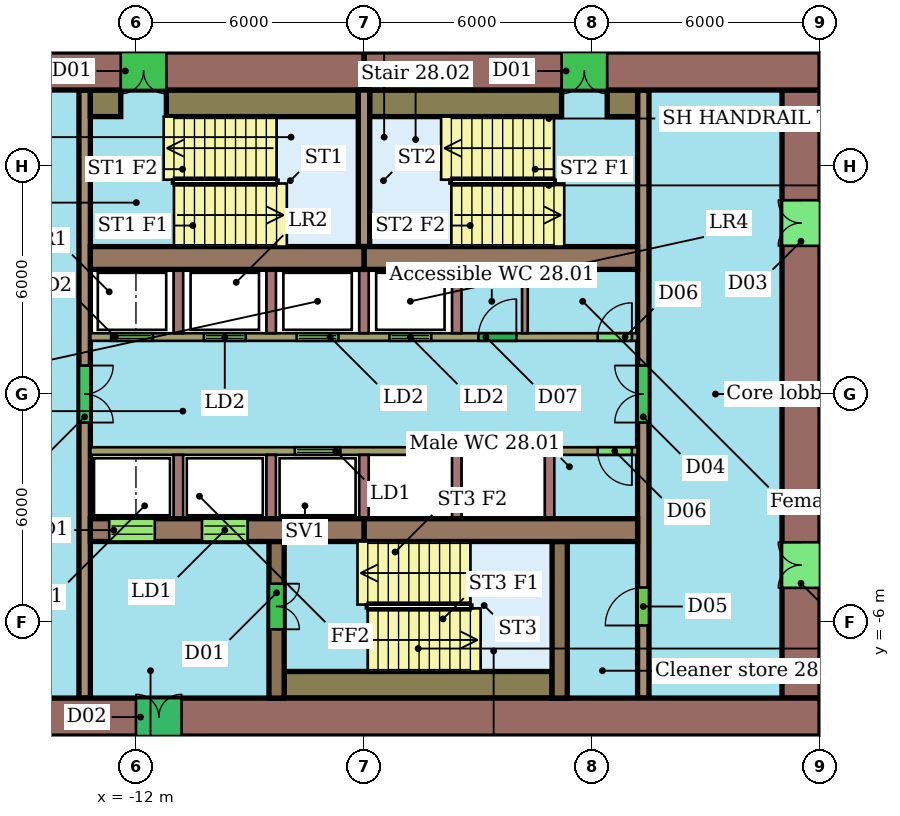
"""IFC4 building model, lengths in metres.
Left out: names, types, materials, properties, quantities, classifications, styles, units other than length and angle.
Written with IfcOpenShell. Run it as: python <this file> out.ifc"""

import sys

from ifc_helpers import new_model, si_unit, direction, frame, frame_2d, origin, place, context, subcontext, project, spatial, rectangle, extrude, element, fill, save


model = new_model("IFC4")
c1 = context("Model", 3, precision=1e-05, world=origin(), true_north=direction((0.0, 1.0)))
c2 = subcontext(c1, "Body", "Model", "MODEL_VIEW")
j1 = project(units=[si_unit("LENGTHUNIT", "METRE"), si_unit("PLANEANGLEUNIT", "RADIAN")], contexts=[c1])
p1 = place(None, origin())
s1 = spatial("IfcSite", under=j1, at=p1, CompositionType="ELEMENT")
p2 = place(p1, origin())
s2 = spatial("IfcBuilding", under=s1, at=p2, CompositionType="ELEMENT")
p3 = place(p2, frame((0.0, 0.0, 121.0)))
s3 = spatial("IfcBuildingStorey", under=s2, at=p3, CompositionType="ELEMENT", Elevation=121.0)
p4 = place(p3, frame((6.0, 8.5, 0.0), z_axis=(0.0, 0.0, 1.0), x_axis=(-1.0, 0.0, 0.0)))
e1 = element("IfcWall", 1, at=p4, inside=s3, PredefinedType="SHEAR", context=c2, shape_type="SweptSolid", body=[
    extrude(rectangle(XDim=12.0, YDim=1.0, at=frame_2d((6.0, 0.0))), origin(), (0.0, 0.0, 1.0), 3.3),
])
p5 = place(p4, frame((5.6, 0.0, 0.0)))
e2 = element("IfcOpeningElement", 2, at=p5, cuts=e1, PredefinedType="OPENING", context=c2, shape_type="SweptSolid", body=[
    extrude(rectangle(XDim=1.2, YDim=2.1, at=frame_2d((0.6, 1.05))), frame((0.0, 0.51, 0.0), z_axis=(0.0, -1.0, 0.0), x_axis=(1.0, 0.0, 0.0)), (0.0, 0.0, 1.0), 1.02),
])
p6 = place(p3, frame((-6.0, 8.5, 0.0), z_axis=(0.0, 0.0, 1.0), x_axis=(-1.0, 0.0, 0.0)))
e3 = element("IfcWall", 3, at=p6, inside=s3, PredefinedType="SHEAR", context=c2, shape_type="SweptSolid", body=[
    extrude(rectangle(XDim=12.0, YDim=1.0, at=frame_2d((6.0, 0.0))), origin(), (0.0, 0.0, 1.0), 3.3),
])
p7 = place(p6, frame((5.2, 0.0, 0.0)))
e4 = element("IfcOpeningElement", 4, at=p7, cuts=e3, PredefinedType="OPENING", context=c2, shape_type="SweptSolid", body=[
    extrude(rectangle(XDim=1.2, YDim=2.1, at=frame_2d((0.6, 1.05))), frame((0.0, 0.51, 0.0), z_axis=(0.0, -1.0, 0.0), x_axis=(1.0, 0.0, 0.0)), (0.0, 0.0, 1.0), 1.02),
])
p8 = place(p3, frame((-18.0, -8.5, 0.0), z_axis=(0.0, 0.0, 1.0), x_axis=(1.0, 0.0, 0.0)))
e5 = element("IfcWall", 5, at=p8, inside=s3, PredefinedType="SHEAR", context=c2, shape_type="SweptSolid", body=[
    extrude(rectangle(XDim=24.0, YDim=1.0, at=frame_2d((12.0, 0.0))), origin(), (0.0, 0.0, 1.0), 3.3),
])
p9 = place(p8, frame((6.0, 0.0, 0.0)))
e6 = element("IfcOpeningElement", 6, at=p9, cuts=e5, PredefinedType="OPENING", context=c2, shape_type="SweptSolid", body=[
    extrude(rectangle(XDim=1.2, YDim=2.1, at=frame_2d((0.6, 1.05))), frame((0.0, 0.51, 0.0), z_axis=(0.0, -1.0, 0.0), x_axis=(1.0, 0.0, 0.0)), (0.0, 0.0, 1.0), 1.02),
])
p10 = place(p3, frame((5.5, -8.0, 0.0), z_axis=(0.0, 0.0, 1.0), x_axis=(0.0, 1.0, 0.0)))
e7 = element("IfcWall", 7, at=p10, inside=s3, PredefinedType="SHEAR", context=c2, shape_type="SweptSolid", body=[
    extrude(rectangle(XDim=16.0, YDim=1.0, at=frame_2d((8.0, 0.0))), origin(), (0.0, 0.0, 1.0), 3.3),
])
p11 = place(p10, frame((2.9, 0.0, 0.0)))
e8 = element("IfcOpeningElement", 8, at=p11, cuts=e7, PredefinedType="OPENING", context=c2, shape_type="SweptSolid", body=[
    extrude(rectangle(XDim=1.2, YDim=2.1, at=frame_2d((0.6, 1.05))), frame((0.0, 0.51, 0.0), z_axis=(0.0, -1.0, 0.0), x_axis=(1.0, 0.0, 0.0)), (0.0, 0.0, 1.0), 1.02),
])
p12 = place(p10, frame((11.9, 0.0, 0.0)))
e9 = element("IfcOpeningElement", 9, at=p12, cuts=e7, PredefinedType="OPENING", context=c2, shape_type="SweptSolid", body=[
    extrude(rectangle(XDim=1.2, YDim=2.1, at=frame_2d((0.6, 1.05))), frame((0.0, 0.51, 0.0), z_axis=(0.0, -1.0, 0.0), x_axis=(1.0, 0.0, 0.0)), (0.0, 0.0, 1.0), 1.02),
])
for number, where, z_axis, x_axis in (
    (10, (-13.2, 3.58, 0.0), (0.0, 0.0, 1.0), (1.0, 0.0, 0.0)),
    (11, (-6.0, 3.58, 0.0), (0.0, 0.0, 1.0), (1.0, 0.0, 0.0)),
):
    element("IfcWall", number, at=place(p3, frame(where, z_axis=z_axis, x_axis=x_axis)), inside=s3, PredefinedType="SHEAR", context=c2, shape_type="SweptSolid", body=[
        extrude(rectangle(XDim=7.2, YDim=0.6, at=frame_2d((3.6, 0.0))), origin(), (0.0, 0.0, 1.0), 3.3),
    ])
p13 = place(p3, frame((-13.2, -3.58, 0.0), z_axis=(0.0, 0.0, 1.0), x_axis=(1.0, 0.0, 0.0)))
e12 = element("IfcWall", 12, at=p13, inside=s3, PredefinedType="SHEAR", context=c2, shape_type="SweptSolid", body=[
    extrude(rectangle(XDim=7.2, YDim=0.6, at=frame_2d((3.6, 0.0))), origin(), (0.0, 0.0, 1.0), 3.3),
])
p14 = place(p13, frame((0.496, 0.0, 0.0)))
e13 = element("IfcOpeningElement", 13, at=p14, cuts=e12, PredefinedType="OPENING", context=c2, shape_type="SweptSolid", body=[
    extrude(rectangle(XDim=1.2, YDim=2.1, at=frame_2d((0.6, 1.05))), frame((0.0, 0.31, 0.0), z_axis=(0.0, -1.0, 0.0), x_axis=(1.0, 0.0, 0.0)), (0.0, 0.0, 1.0), 0.62),
])
p15 = place(p13, frame((2.938, 0.0, 0.0)))
e14 = element("IfcOpeningElement", 14, at=p15, cuts=e12, PredefinedType="OPENING", context=c2, shape_type="SweptSolid", body=[
    extrude(rectangle(XDim=1.2, YDim=2.1, at=frame_2d((0.6, 1.05))), frame((0.0, 0.31, 0.0), z_axis=(0.0, -1.0, 0.0), x_axis=(1.0, 0.0, 0.0)), (0.0, 0.0, 1.0), 0.62),
])
p16 = place(p3, frame((-6.0, -3.58, 0.0), z_axis=(0.0, 0.0, 1.0), x_axis=(1.0, 0.0, 0.0)))
e15 = element("IfcWall", 15, at=p16, inside=s3, PredefinedType="SHEAR", context=c2, shape_type="SweptSolid", body=[
    extrude(rectangle(XDim=7.2, YDim=0.6, at=frame_2d((3.6, 0.0))), origin(), (0.0, 0.0, 1.0), 3.3),
])
p17 = place(p3, frame((-13.35, 8.0, 0.0), z_axis=(0.0, 0.0, 1.0), x_axis=(0.0, -1.0, 0.0)))
e16 = element("IfcWall", 16, at=p17, inside=s3, PredefinedType="SHEAR", context=c2, shape_type="SweptSolid", body=[
    extrude(rectangle(XDim=16.0, YDim=0.3, at=frame_2d((8.0, 0.0))), origin(), (0.0, 0.0, 1.0), 3.3),
])
p18 = place(p17, frame((7.25, 0.0, 0.0)))
e17 = element("IfcOpeningElement", 17, at=p18, cuts=e16, PredefinedType="OPENING", context=c2, shape_type="SweptSolid", body=[
    extrude(rectangle(XDim=1.5, YDim=2.1, at=frame_2d((0.75, 1.05))), frame((0.0, 0.16, 0.0), z_axis=(0.0, -1.0, 0.0), x_axis=(1.0, 0.0, 0.0)), (0.0, 0.0, 1.0), 0.32),
])
p19 = place(p3, frame((1.35, -8.0, 0.0), z_axis=(0.0, 0.0, 1.0), x_axis=(0.0, 1.0, 0.0)))
e18 = element("IfcWall", 18, at=p19, inside=s3, PredefinedType="SHEAR", context=c2, shape_type="SweptSolid", body=[
    extrude(rectangle(XDim=16.0, YDim=0.3, at=frame_2d((8.0, 0.0))), origin(), (0.0, 0.0, 1.0), 3.3),
])
p20 = place(p19, frame((1.91, 0.0, 0.0)))
e19 = element("IfcOpeningElement", 19, at=p20, cuts=e18, PredefinedType="OPENING", context=c2, shape_type="SweptSolid", body=[
    extrude(rectangle(XDim=1.0, YDim=2.1, at=frame_2d((0.5, 1.05))), frame((0.0, 0.16, 0.0), z_axis=(0.0, -1.0, 0.0), x_axis=(1.0, 0.0, 0.0)), (0.0, 0.0, 1.0), 0.32),
])
p21 = place(p19, frame((7.25, 0.0, 0.0)))
e20 = element("IfcOpeningElement", 20, at=p21, cuts=e18, PredefinedType="OPENING", context=c2, shape_type="SweptSolid", body=[
    extrude(rectangle(XDim=1.5, YDim=2.1, at=frame_2d((0.75, 1.05))), frame((0.0, 0.16, 0.0), z_axis=(0.0, -1.0, 0.0), x_axis=(1.0, 0.0, 0.0)), (0.0, 0.0, 1.0), 0.32),
])
p22 = place(p3, frame((-13.2, 1.5, 0.0), z_axis=(0.0, 0.0, 1.0), x_axis=(1.0, 0.0, 0.0)))
e21 = element("IfcWall", 21, at=p22, inside=s3, PredefinedType="SHEAR", context=c2, shape_type="SweptSolid", body=[
    extrude(rectangle(XDim=14.4, YDim=0.2, at=frame_2d((7.2, 0.0))), origin(), (0.0, 0.0, 1.0), 3.3),
])
p23 = place(p22, frame((0.546, 0.0, 0.0)))
e22 = element("IfcOpeningElement", 22, at=p23, cuts=e21, PredefinedType="OPENING", context=c2, shape_type="SweptSolid", body=[
    extrude(rectangle(XDim=1.1, YDim=2.1, at=frame_2d((0.55, 1.05))), frame((0.0, 0.11, 0.0), z_axis=(0.0, -1.0, 0.0), x_axis=(1.0, 0.0, 0.0)), (0.0, 0.0, 1.0), 0.22),
])
p24 = place(p22, frame((2.988, 0.0, 0.0)))
e23 = element("IfcOpeningElement", 23, at=p24, cuts=e21, PredefinedType="OPENING", context=c2, shape_type="SweptSolid", body=[
    extrude(rectangle(XDim=1.1, YDim=2.1, at=frame_2d((0.55, 1.05))), frame((0.0, 0.11, 0.0), z_axis=(0.0, -1.0, 0.0), x_axis=(1.0, 0.0, 0.0)), (0.0, 0.0, 1.0), 0.22),
])
p25 = place(p22, frame((5.429, 0.0, 0.0)))
e24 = element("IfcOpeningElement", 24, at=p25, cuts=e21, PredefinedType="OPENING", context=c2, shape_type="SweptSolid", body=[
    extrude(rectangle(XDim=1.1, YDim=2.1, at=frame_2d((0.55, 1.05))), frame((0.0, 0.11, 0.0), z_axis=(0.0, -1.0, 0.0), x_axis=(1.0, 0.0, 0.0)), (0.0, 0.0, 1.0), 0.22),
])
p26 = place(p22, frame((7.871, 0.0, 0.0)))
e25 = element("IfcOpeningElement", 25, at=p26, cuts=e21, PredefinedType="OPENING", context=c2, shape_type="SweptSolid", body=[
    extrude(rectangle(XDim=1.1, YDim=2.1, at=frame_2d((0.55, 1.05))), frame((0.0, 0.11, 0.0), z_axis=(0.0, -1.0, 0.0), x_axis=(1.0, 0.0, 0.0)), (0.0, 0.0, 1.0), 0.22),
])
p27 = place(p22, frame((10.21, 0.0, 0.0)))
e26 = element("IfcOpeningElement", 26, at=p27, cuts=e21, PredefinedType="OPENING", context=c2, shape_type="SweptSolid", body=[
    extrude(rectangle(XDim=1.0, YDim=2.1, at=frame_2d((0.5, 1.05))), frame((0.0, 0.11, 0.0), z_axis=(0.0, -1.0, 0.0), x_axis=(1.0, 0.0, 0.0)), (0.0, 0.0, 1.0), 0.22),
])
p28 = place(p22, frame((13.35, 0.0, 0.0)))
e27 = element("IfcOpeningElement", 27, at=p28, cuts=e21, PredefinedType="OPENING", context=c2, shape_type="SweptSolid", body=[
    extrude(rectangle(XDim=0.9, YDim=2.1, at=frame_2d((0.45, 1.05))), frame((0.0, 0.11, 0.0), z_axis=(0.0, -1.0, 0.0), x_axis=(1.0, 0.0, 0.0)), (0.0, 0.0, 1.0), 0.22),
])
p29 = place(p3, frame((1.2, -1.5, 0.0), z_axis=(0.0, 0.0, 1.0), x_axis=(-1.0, 0.0, 0.0)))
e28 = element("IfcWall", 28, at=p29, inside=s3, PredefinedType="SHEAR", context=c2, shape_type="SweptSolid", body=[
    extrude(rectangle(XDim=14.4, YDim=0.2, at=frame_2d((7.2, 0.0))), origin(), (0.0, 0.0, 1.0), 3.3),
])
p30 = place(p29, frame((7.821, 0.0, 0.0)))
e29 = element("IfcOpeningElement", 29, at=p30, cuts=e28, PredefinedType="OPENING", context=c2, shape_type="SweptSolid", body=[
    extrude(rectangle(XDim=1.2, YDim=2.1, at=frame_2d((0.6, 1.05))), frame((0.0, 0.11, 0.0), z_axis=(0.0, -1.0, 0.0), x_axis=(1.0, 0.0, 0.0)), (0.0, 0.0, 1.0), 0.22),
])
p31 = place(p29, frame((0.15, 0.0, 0.0)))
e30 = element("IfcOpeningElement", 30, at=p31, cuts=e28, PredefinedType="OPENING", context=c2, shape_type="SweptSolid", body=[
    extrude(rectangle(XDim=0.9, YDim=2.1, at=frame_2d((0.45, 1.05))), frame((0.0, 0.11, 0.0), z_axis=(0.0, -1.0, 0.0), x_axis=(1.0, 0.0, 0.0)), (0.0, 0.0, 1.0), 0.22),
])
p32 = place(p3, frame((-8.3, -3.88, 0.0), z_axis=(0.0, 0.0, 1.0), x_axis=(0.0, -1.0, 0.0)))
e31 = element("IfcWall", 31, at=p32, inside=s3, PredefinedType="SHEAR", context=c2, shape_type="SweptSolid", body=[
    extrude(rectangle(XDim=4.12, YDim=0.4, at=frame_2d((2.06, 0.0))), origin(), (0.0, 0.0, 1.0), 3.3),
])
p33 = place(p32, frame((1.11, 0.0, 0.0)))
e32 = element("IfcOpeningElement", 32, at=p33, cuts=e31, PredefinedType="OPENING", context=c2, shape_type="SweptSolid", body=[
    extrude(rectangle(XDim=1.2, YDim=2.1, at=frame_2d((0.6, 1.05))), frame((0.0, 0.21, 0.0), z_axis=(0.0, -1.0, 0.0), x_axis=(1.0, 0.0, 0.0)), (0.0, 0.0, 1.0), 0.42),
])
p34 = place(p3, frame((-0.85, -3.88, 0.0), z_axis=(0.0, 0.0, 1.0), x_axis=(0.0, -1.0, 0.0)))
e33 = element("IfcWall", 33, at=p34, inside=s3, PredefinedType="SHEAR", context=c2, shape_type="SweptSolid", body=[
    extrude(rectangle(XDim=4.12, YDim=0.4, at=frame_2d((2.06, 0.0))), origin(), (0.0, 0.0, 1.0), 3.3),
])
p35 = place(p3, frame((-6.0, 3.88, 0.0), z_axis=(0.0, 0.0, 1.0), x_axis=(0.0, 1.0, 0.0)))
e34 = element("IfcWall", 34, at=p35, inside=s3, PredefinedType="SHEAR", context=c2, shape_type="SweptSolid", body=[
    extrude(rectangle(XDim=4.12, YDim=0.3, at=frame_2d((2.06, 0.0))), origin(), (0.0, 0.0, 1.0), 3.3),
])
p36 = place(p3, frame((-13.2, 7.65, 0.0), z_axis=(0.0, 0.0, 1.0), x_axis=(1.0, 0.0, 0.0)))
e35 = element("IfcWall", 35, at=p36, inside=s3, PredefinedType="SHEAR", context=c2, shape_type="SweptSolid", body=[
    extrude(rectangle(XDim=0.8, YDim=0.7, at=frame_2d((0.4, 0.0))), origin(), (0.0, 0.0, 1.0), 3.3),
])
for number, where, z_axis, x_axis in (
    (36, (-11.2, 7.65, 0.0), (0.0, 0.0, 1.0), (1.0, 0.0, 0.0)),
    (37, (-5.85, 7.65, 0.0), (0.0, 0.0, 1.0), (1.0, 0.0, 0.0)),
):
    element("IfcWall", number, at=place(p3, frame(where, z_axis=z_axis, x_axis=x_axis)), inside=s3, PredefinedType="SHEAR", context=c2, shape_type="SweptSolid", body=[
        extrude(rectangle(XDim=5.05, YDim=0.7, at=frame_2d((2.525, 0.0))), origin(), (0.0, 0.0, 1.0), 3.3),
    ])
p37 = place(p3, frame((0.4, 7.65, 0.0), z_axis=(0.0, 0.0, 1.0), x_axis=(1.0, 0.0, 0.0)))
e38 = element("IfcWall", 38, at=p37, inside=s3, PredefinedType="SHEAR", context=c2, shape_type="SweptSolid", body=[
    extrude(rectangle(XDim=0.8, YDim=0.7, at=frame_2d((0.4, 0.0))), origin(), (0.0, 0.0, 1.0), 3.3),
])
p38 = place(p3, frame((-8.1, -7.65, 0.0), z_axis=(0.0, 0.0, 1.0), x_axis=(1.0, 0.0, 0.0)))
e39 = element("IfcWall", 39, at=p38, inside=s3, PredefinedType="SHEAR", context=c2, shape_type="SweptSolid", body=[
    extrude(rectangle(XDim=7.05, YDim=0.7, at=frame_2d((3.525, 0.0))), origin(), (0.0, 0.0, 1.0), 3.3),
])
for number, where, z_axis, x_axis in (
    (40, (-10.883, 1.6, 0.0), (0.0, 0.0, 1.0), (0.0, 1.0, 0.0)),
    (41, (-8.442, 1.6, 0.0), (0.0, 0.0, 1.0), (0.0, 1.0, 0.0)),
    (42, (-6.0, 1.6, 0.0), (0.0, 0.0, 1.0), (0.0, 1.0, 0.0)),
    (43, (-3.558, 1.6, 0.0), (0.0, 0.0, 1.0), (0.0, 1.0, 0.0)),
):
    element("IfcWall", number, at=place(p3, frame(where, z_axis=z_axis, x_axis=x_axis)), inside=s3, PredefinedType="SHEAR", context=c2, shape_type="SweptSolid", body=[
        extrude(rectangle(XDim=1.68, YDim=0.25, at=frame_2d((0.84, 0.0))), origin(), (0.0, 0.0, 1.0), 3.3),
    ])
p39 = place(p3, frame((-1.765, 1.6, 0.0), z_axis=(0.0, 0.0, 1.0), x_axis=(0.0, 1.0, 0.0)))
e44 = element("IfcWall", 44, at=p39, inside=s3, PredefinedType="PARTITIONING", context=c2, shape_type="SweptSolid", body=[
    extrude(rectangle(XDim=1.68, YDim=0.15, at=frame_2d((0.84, 0.0))), origin(), (0.0, 0.0, 1.0), 3.3),
])
for number, where, z_axis, x_axis in (
    (45, (-10.883, -1.6, 0.0), (0.0, 0.0, 1.0), (0.0, -1.0, 0.0)),
    (46, (-8.442, -1.6, 0.0), (0.0, 0.0, 1.0), (0.0, -1.0, 0.0)),
    (47, (-6.0, -1.6, 0.0), (0.0, 0.0, 1.0), (0.0, -1.0, 0.0)),
    (48, (-3.558, -1.6, 0.0), (0.0, 0.0, 1.0), (0.0, -1.0, 0.0)),
    (49, (-1.117, -1.6, 0.0), (0.0, 0.0, 1.0), (0.0, -1.0, 0.0)),
):
    element("IfcWall", number, at=place(p3, frame(where, z_axis=z_axis, x_axis=x_axis)), inside=s3, PredefinedType="SHEAR", context=c2, shape_type="SweptSolid", body=[
        extrude(rectangle(XDim=1.68, YDim=0.25, at=frame_2d((0.84, 0.0))), origin(), (0.0, 0.0, 1.0), 3.3),
    ])
p40 = place(p5, origin())
e50 = element("IfcDoor", 50, at=p40, inside=s3, OperationType="DOUBLE_DOOR_SINGLE_SWING", PredefinedType="NOTDEFINED", context=c2, shape_type="SweptSolid", body=[
    extrude(rectangle(XDim=1.2, YDim=2.1, at=frame_2d((0.6, 1.05))), frame((0.0, 0.025, 0.0), z_axis=(0.0, -1.0, 0.0), x_axis=(1.0, 0.0, 0.0)), (0.0, 0.0, 1.0), 0.05),
])
fill(e2, e50)
p41 = place(p7, origin())
e51 = element("IfcDoor", 51, at=p41, inside=s3, OperationType="DOUBLE_DOOR_SINGLE_SWING", PredefinedType="NOTDEFINED", context=c2, shape_type="SweptSolid", body=[
    extrude(rectangle(XDim=1.2, YDim=2.1, at=frame_2d((0.6, 1.05))), frame((0.0, 0.025, 0.0), z_axis=(0.0, -1.0, 0.0), x_axis=(1.0, 0.0, 0.0)), (0.0, 0.0, 1.0), 0.05),
])
fill(e4, e51)
p42 = place(p9, origin())
e52 = element("IfcDoor", 52, at=p42, inside=s3, OperationType="DOUBLE_DOOR_SINGLE_SWING", PredefinedType="NOTDEFINED", context=c2, shape_type="SweptSolid", body=[
    extrude(rectangle(XDim=1.2, YDim=2.1, at=frame_2d((0.6, 1.05))), frame((0.0, 0.025, 0.0), z_axis=(0.0, -1.0, 0.0), x_axis=(1.0, 0.0, 0.0)), (0.0, 0.0, 1.0), 0.05),
])
fill(e6, e52)
p43 = place(p11, origin())
e53 = element("IfcDoor", 53, at=p43, inside=s3, OperationType="DOUBLE_DOOR_SINGLE_SWING", PredefinedType="NOTDEFINED", context=c2, shape_type="SweptSolid", body=[
    extrude(rectangle(XDim=1.2, YDim=2.1, at=frame_2d((0.6, 1.05))), frame((0.0, 0.025, 0.0), z_axis=(0.0, -1.0, 0.0), x_axis=(1.0, 0.0, 0.0)), (0.0, 0.0, 1.0), 0.05),
])
fill(e8, e53)
p44 = place(p12, origin())
e54 = element("IfcDoor", 54, at=p44, inside=s3, OperationType="DOUBLE_DOOR_SINGLE_SWING", PredefinedType="NOTDEFINED", context=c2, shape_type="SweptSolid", body=[
    extrude(rectangle(XDim=1.2, YDim=2.1, at=frame_2d((0.6, 1.05))), frame((0.0, 0.025, 0.0), z_axis=(0.0, -1.0, 0.0), x_axis=(1.0, 0.0, 0.0)), (0.0, 0.0, 1.0), 0.05),
])
fill(e9, e54)
p45 = place(p14, origin())
e55 = element("IfcDoor", 55, at=p45, inside=s3, OperationType="DOUBLE_DOOR_SLIDING", PredefinedType="NOTDEFINED", context=c2, shape_type="SweptSolid", body=[
    extrude(rectangle(XDim=1.2, YDim=2.1, at=frame_2d((0.6, 1.05))), frame((0.0, 0.025, 0.0), z_axis=(0.0, -1.0, 0.0), x_axis=(1.0, 0.0, 0.0)), (0.0, 0.0, 1.0), 0.05),
])
fill(e13, e55)
p46 = place(p15, origin())
e56 = element("IfcDoor", 56, at=p46, inside=s3, OperationType="DOUBLE_DOOR_SLIDING", PredefinedType="NOTDEFINED", context=c2, shape_type="SweptSolid", body=[
    extrude(rectangle(XDim=1.2, YDim=2.1, at=frame_2d((0.6, 1.05))), frame((0.0, 0.025, 0.0), z_axis=(0.0, -1.0, 0.0), x_axis=(1.0, 0.0, 0.0)), (0.0, 0.0, 1.0), 0.05),
])
fill(e14, e56)
p47 = place(p18, origin())
e57 = element("IfcDoor", 57, at=p47, inside=s3, OperationType="DOUBLE_DOOR_SINGLE_SWING", PredefinedType="NOTDEFINED", context=c2, shape_type="SweptSolid", body=[
    extrude(rectangle(XDim=1.5, YDim=2.1, at=frame_2d((0.75, 1.05))), frame((0.0, 0.025, 0.0), z_axis=(0.0, -1.0, 0.0), x_axis=(1.0, 0.0, 0.0)), (0.0, 0.0, 1.0), 0.05),
])
fill(e17, e57)
p48 = place(p20, origin())
e58 = element("IfcDoor", 58, at=p48, inside=s3, OperationType="SINGLE_SWING_LEFT", PredefinedType="NOTDEFINED", context=c2, shape_type="SweptSolid", body=[
    extrude(rectangle(XDim=1.0, YDim=2.1, at=frame_2d((0.5, 1.05))), frame((0.0, 0.025, 0.0), z_axis=(0.0, -1.0, 0.0), x_axis=(1.0, 0.0, 0.0)), (0.0, 0.0, 1.0), 0.05),
])
fill(e19, e58)
p49 = place(p21, origin())
e59 = element("IfcDoor", 59, at=p49, inside=s3, OperationType="DOUBLE_DOOR_SINGLE_SWING", PredefinedType="NOTDEFINED", context=c2, shape_type="SweptSolid", body=[
    extrude(rectangle(XDim=1.5, YDim=2.1, at=frame_2d((0.75, 1.05))), frame((0.0, 0.025, 0.0), z_axis=(0.0, -1.0, 0.0), x_axis=(1.0, 0.0, 0.0)), (0.0, 0.0, 1.0), 0.05),
])
fill(e20, e59)
p50 = place(p23, origin())
e60 = element("IfcDoor", 60, at=p50, inside=s3, OperationType="DOUBLE_DOOR_SLIDING", PredefinedType="NOTDEFINED", context=c2, shape_type="SweptSolid", body=[
    extrude(rectangle(XDim=1.1, YDim=2.1, at=frame_2d((0.55, 1.05))), frame((0.0, 0.025, 0.0), z_axis=(0.0, -1.0, 0.0), x_axis=(1.0, 0.0, 0.0)), (0.0, 0.0, 1.0), 0.05),
])
fill(e22, e60)
p51 = place(p24, origin())
e61 = element("IfcDoor", 61, at=p51, inside=s3, OperationType="DOUBLE_DOOR_SLIDING", PredefinedType="NOTDEFINED", context=c2, shape_type="SweptSolid", body=[
    extrude(rectangle(XDim=1.1, YDim=2.1, at=frame_2d((0.55, 1.05))), frame((0.0, 0.025, 0.0), z_axis=(0.0, -1.0, 0.0), x_axis=(1.0, 0.0, 0.0)), (0.0, 0.0, 1.0), 0.05),
])
fill(e23, e61)
p52 = place(p25, origin())
e62 = element("IfcDoor", 62, at=p52, inside=s3, OperationType="DOUBLE_DOOR_SLIDING", PredefinedType="NOTDEFINED", context=c2, shape_type="SweptSolid", body=[
    extrude(rectangle(XDim=1.1, YDim=2.1, at=frame_2d((0.55, 1.05))), frame((0.0, 0.025, 0.0), z_axis=(0.0, -1.0, 0.0), x_axis=(1.0, 0.0, 0.0)), (0.0, 0.0, 1.0), 0.05),
])
fill(e24, e62)
p53 = place(p26, origin())
e63 = element("IfcDoor", 63, at=p53, inside=s3, OperationType="DOUBLE_DOOR_SLIDING", PredefinedType="NOTDEFINED", context=c2, shape_type="SweptSolid", body=[
    extrude(rectangle(XDim=1.1, YDim=2.1, at=frame_2d((0.55, 1.05))), frame((0.0, 0.025, 0.0), z_axis=(0.0, -1.0, 0.0), x_axis=(1.0, 0.0, 0.0)), (0.0, 0.0, 1.0), 0.05),
])
fill(e25, e63)
p54 = place(p27, origin())
e64 = element("IfcDoor", 64, at=p54, inside=s3, OperationType="SINGLE_SWING_RIGHT", PredefinedType="NOTDEFINED", context=c2, shape_type="SweptSolid", body=[
    extrude(rectangle(XDim=1.0, YDim=2.1, at=frame_2d((0.5, 1.05))), frame((0.0, 0.025, 0.0), z_axis=(0.0, -1.0, 0.0), x_axis=(1.0, 0.0, 0.0)), (0.0, 0.0, 1.0), 0.05),
])
fill(e26, e64)
p55 = place(p28, origin())
e65 = element("IfcDoor", 65, at=p55, inside=s3, OperationType="SINGLE_SWING_RIGHT", PredefinedType="NOTDEFINED", context=c2, shape_type="SweptSolid", body=[
    extrude(rectangle(XDim=0.9, YDim=2.1, at=frame_2d((0.45, 1.05))), frame((0.0, 0.025, 0.0), z_axis=(0.0, -1.0, 0.0), x_axis=(1.0, 0.0, 0.0)), (0.0, 0.0, 1.0), 0.05),
])
fill(e27, e65)
p56 = place(p30, origin())
e66 = element("IfcDoor", 66, at=p56, inside=s3, OperationType="DOUBLE_DOOR_SLIDING", PredefinedType="NOTDEFINED", context=c2, shape_type="SweptSolid", body=[
    extrude(rectangle(XDim=1.2, YDim=2.1, at=frame_2d((0.6, 1.05))), frame((0.0, 0.025, 0.0), z_axis=(0.0, -1.0, 0.0), x_axis=(1.0, 0.0, 0.0)), (0.0, 0.0, 1.0), 0.05),
])
fill(e29, e66)
p57 = place(p31, origin())
e67 = element("IfcDoor", 67, at=p57, inside=s3, OperationType="SINGLE_SWING_LEFT", PredefinedType="NOTDEFINED", context=c2, shape_type="SweptSolid", body=[
    extrude(rectangle(XDim=0.9, YDim=2.1, at=frame_2d((0.45, 1.05))), frame((0.0, 0.025, 0.0), z_axis=(0.0, -1.0, 0.0), x_axis=(1.0, 0.0, 0.0)), (0.0, 0.0, 1.0), 0.05),
])
fill(e30, e67)
p58 = place(p33, origin())
e68 = element("IfcDoor", 68, at=p58, inside=s3, OperationType="DOUBLE_DOOR_SINGLE_SWING", PredefinedType="NOTDEFINED", context=c2, shape_type="SweptSolid", body=[
    extrude(rectangle(XDim=1.2, YDim=2.1, at=frame_2d((0.6, 1.05))), frame((0.0, 0.025, 0.0), z_axis=(0.0, -1.0, 0.0), x_axis=(1.0, 0.0, 0.0)), (0.0, 0.0, 1.0), 0.05),
])
fill(e32, e68)
save(model, sys.argv[1])
